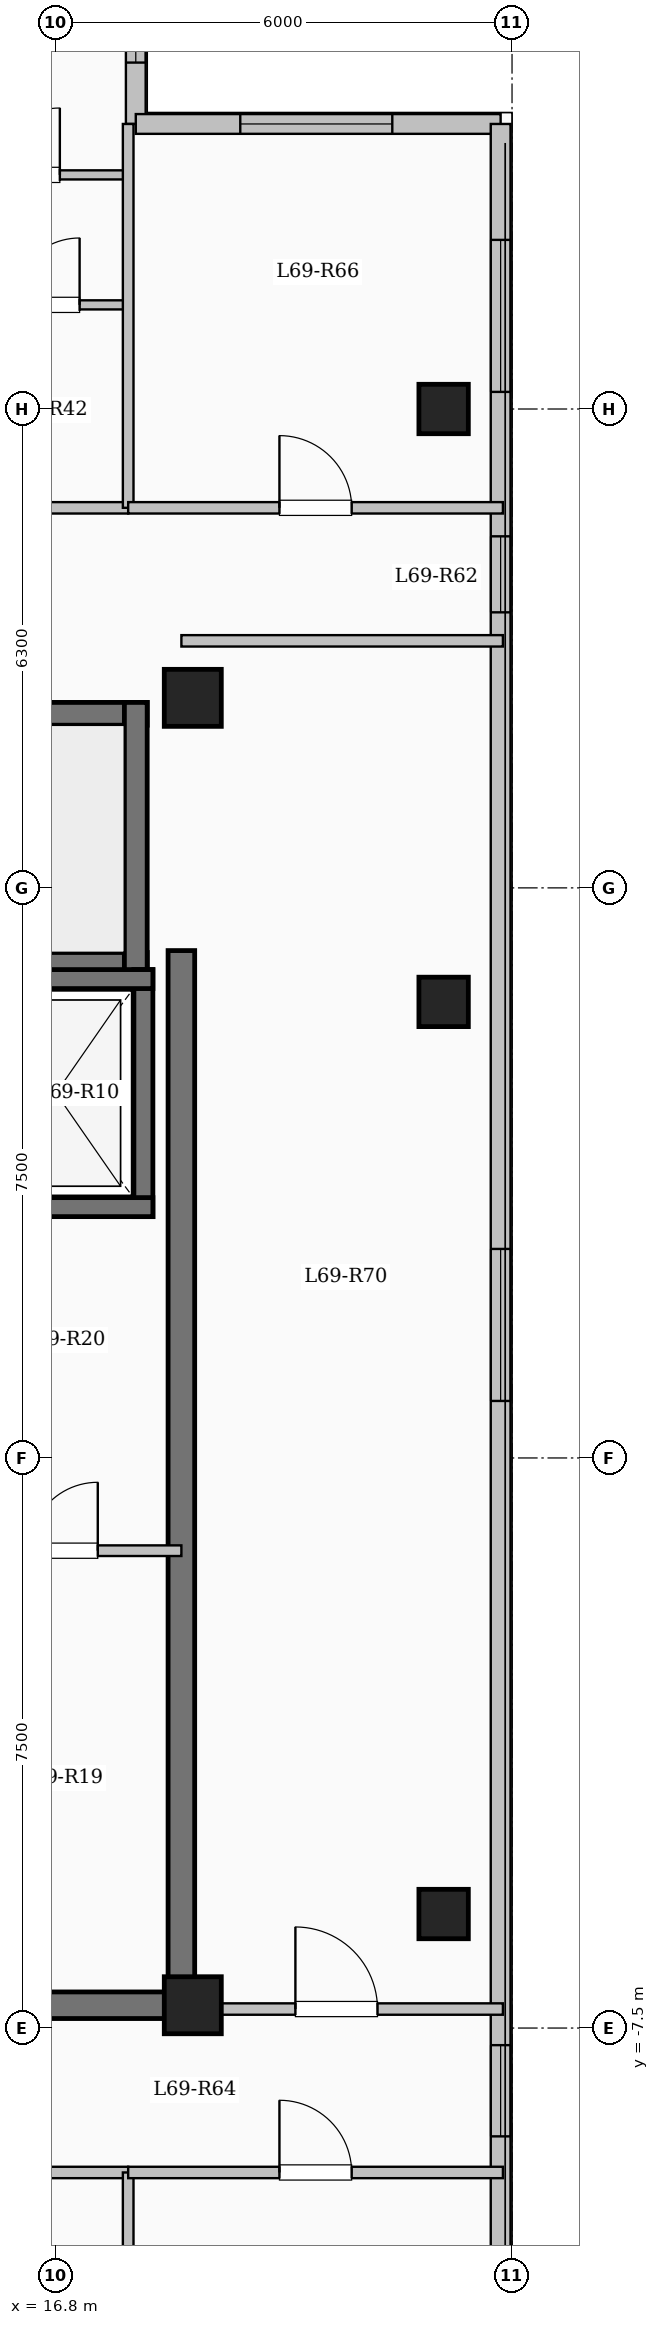
"""IFC4 building model, lengths in metres.
Left out: names, types, materials, properties, quantities, classifications, styles, units other than length and angle.
Written with IfcOpenShell. Run it as: python <this file> out.ifc"""

import sys

from ifc_helpers import new_model, si_unit, direction, frame, frame_2d, origin, origin_2d, place, context, subcontext, project, spatial, rectangle, extrude, element, fill, save


model = new_model("IFC4")
c1 = context("Model", 3, precision=1e-05, world=origin(), true_north=direction((0.0, 1.0)))
c2 = subcontext(c1, "Body", "Model", "MODEL_VIEW")
j1 = project(units=[si_unit("LENGTHUNIT", "METRE"), si_unit("PLANEANGLEUNIT", "RADIAN")], contexts=[c1])
p1 = place(None, origin())
s1 = spatial("IfcSite", under=j1, at=p1, CompositionType="ELEMENT")
p2 = place(p1, origin())
s2 = spatial("IfcBuilding", under=s1, at=p2, CompositionType="ELEMENT")
p3 = place(p2, frame((0.0, 0.0, 254.9)))
s3 = spatial("IfcBuildingStorey", under=s2, at=p3, CompositionType="ELEMENT", Elevation=254.9)
for number, where, z_axis, x_axis in (
    (1, (18.6, -7.2, 0.0), (0.0, 0.0, 1.0), (1.0, 0.0, 0.0)),
    (2, (18.6, 10.0, 0.0), (0.0, 0.0, 1.0), (1.0, 0.0, 0.0)),
):
    element("IfcColumn", number, at=place(p3, frame(where, z_axis=z_axis, x_axis=x_axis)), inside=s3, PredefinedType="COLUMN", context=c2, shape_type="SweptSolid", body=[
        extrude(rectangle(XDim=0.75, YDim=0.75, at=origin_2d()), origin(), (0.0, 0.0, 1.0), 3.35),
    ])
for number, where, z_axis, x_axis in (
    (3, (21.9, -6.0, 0.0), (0.0, 0.0, 1.0), (1.0, 0.0, 0.0)),
    (4, (21.9, 6.0, 0.0), (0.0, 0.0, 1.0), (1.0, 0.0, 0.0)),
    (5, (21.9, 13.8, 0.0), (0.0, 0.0, 1.0), (1.0, 0.0, 0.0)),
):
    element("IfcColumn", number, at=place(p3, frame(where, z_axis=z_axis, x_axis=x_axis)), inside=s3, PredefinedType="COLUMN", context=c2, shape_type="SweptSolid", body=[
        extrude(rectangle(XDim=0.65, YDim=0.65, at=origin_2d()), origin(), (0.0, 0.0, 1.0), 3.35),
    ])
p4 = place(p3, frame((17.85, 20.85, 0.0), z_axis=(0.0, 0.0, 1.0), x_axis=(0.0, -1.0, 0.0)))
e6 = element("IfcWall", 6, at=p4, inside=s3, PredefinedType="SOLIDWALL", context=c2, shape_type="SweptSolid", body=[
    extrude(rectangle(XDim=3.3, YDim=0.26, at=frame_2d((1.65, 0.0))), origin(), (0.0, 0.0, 1.0), 3.1),
])
p5 = place(p4, frame((0.843, 0.0, 0.9)))
e7 = element("IfcOpeningElement", 7, at=p5, cuts=e6, PredefinedType="OPENING", context=c2, shape_type="SweptSolid", body=[
    extrude(rectangle(XDim=1.65, YDim=1.6, at=frame_2d((0.825, 0.8))), frame((0.0, 0.14, 0.0), z_axis=(0.0, -1.0, 0.0), x_axis=(1.0, 0.0, 0.0)), (0.0, 0.0, 1.0), 0.28),
])
p6 = place(p3, frame((17.85, 17.55, 0.0), z_axis=(0.0, 0.0, 1.0), x_axis=(1.0, 0.0, 0.0)))
e8 = element("IfcWall", 8, at=p6, inside=s3, PredefinedType="SOLIDWALL", context=c2, shape_type="SweptSolid", body=[
    extrude(rectangle(XDim=4.8, YDim=0.26, at=frame_2d((2.4, 0.0))), origin(), (0.0, 0.0, 1.0), 3.1),
])
p7 = place(p6, frame((1.375, 0.0, 0.9)))
e9 = element("IfcOpeningElement", 9, at=p7, cuts=e8, PredefinedType="OPENING", context=c2, shape_type="SweptSolid", body=[
    extrude(rectangle(XDim=2.0, YDim=1.7, at=frame_2d((1.0, 0.85))), frame((0.0, 0.14, 0.0), z_axis=(0.0, -1.0, 0.0), x_axis=(1.0, 0.0, 0.0)), (0.0, 0.0, 1.0), 0.28),
])
p8 = place(p3, frame((22.65, 17.55, 0.0), z_axis=(0.0, 0.0, 1.0), x_axis=(0.0, -1.0, 0.0)))
e10 = element("IfcWall", 10, at=p8, inside=s3, PredefinedType="SOLIDWALL", context=c2, shape_type="SweptSolid", body=[
    extrude(rectangle(XDim=35.1, YDim=0.26, at=frame_2d((17.55, 0.0))), origin(), (0.0, 0.0, 1.0), 3.1),
])
p9 = place(p8, frame((1.525, 0.0, 0.9)))
e11 = element("IfcOpeningElement", 11, at=p9, cuts=e10, PredefinedType="OPENING", context=c2, shape_type="SweptSolid", body=[
    extrude(rectangle(XDim=2.0, YDim=1.7, at=frame_2d((1.0, 0.85))), frame((0.0, 0.14, 0.0), z_axis=(0.0, -1.0, 0.0), x_axis=(1.0, 0.0, 0.0)), (0.0, 0.0, 1.0), 0.28),
])
p10 = place(p8, frame((5.425, 0.0, 0.95)))
e12 = element("IfcOpeningElement", 12, at=p10, cuts=e10, PredefinedType="OPENING", context=c2, shape_type="SweptSolid", body=[
    extrude(rectangle(XDim=1.0, YDim=1.5, at=frame_2d((0.5, 0.75))), frame((0.0, 0.14, 0.0), z_axis=(0.0, -1.0, 0.0), x_axis=(1.0, 0.0, 0.0)), (0.0, 0.0, 1.0), 0.28),
])
p11 = place(p8, frame((14.8, 0.0, 0.9)))
e13 = element("IfcOpeningElement", 13, at=p11, cuts=e10, PredefinedType="OPENING", context=c2, shape_type="SweptSolid", body=[
    extrude(rectangle(XDim=2.0, YDim=1.7, at=frame_2d((1.0, 0.85))), frame((0.0, 0.14, 0.0), z_axis=(0.0, -1.0, 0.0), x_axis=(1.0, 0.0, 0.0)), (0.0, 0.0, 1.0), 0.28),
])
p12 = place(p8, frame((25.275, 0.0, 0.95)))
e14 = element("IfcOpeningElement", 14, at=p12, cuts=e10, PredefinedType="OPENING", context=c2, shape_type="SweptSolid", body=[
    extrude(rectangle(XDim=1.2, YDim=1.5, at=frame_2d((0.6, 0.75))), frame((0.0, 0.14, 0.0), z_axis=(0.0, -1.0, 0.0), x_axis=(1.0, 0.0, 0.0)), (0.0, 0.0, 1.0), 0.28),
])
p13 = place(p8, frame((29.925, 0.0, 0.9)))
e15 = element("IfcOpeningElement", 15, at=p13, cuts=e10, PredefinedType="OPENING", context=c2, shape_type="SweptSolid", body=[
    extrude(rectangle(XDim=2.2, YDim=1.75, at=frame_2d((1.1, 0.875))), frame((0.0, 0.14, 0.0), z_axis=(0.0, -1.0, 0.0), x_axis=(1.0, 0.0, 0.0)), (0.0, 0.0, 1.0), 0.28),
])
p14 = place(p3, frame((10.0, 9.79, 0.0), z_axis=(0.0, 0.0, 1.0), x_axis=(1.0, 0.0, 0.0)))
e16 = element("IfcWall", 16, at=p14, inside=s3, PredefinedType="SHEAR", context=c2, shape_type="SweptSolid", body=[
    extrude(rectangle(XDim=8.0, YDim=0.3, at=frame_2d((4.0, 0.0))), origin(), (0.0, 0.0, 1.0), 3.35),
])
p15 = place(p3, frame((10.0, 6.5, 0.0), z_axis=(0.0, 0.0, 1.0), x_axis=(1.0, 0.0, 0.0)))
e17 = element("IfcWall", 17, at=p15, inside=s3, PredefinedType="SHEAR", context=c2, shape_type="SweptSolid", body=[
    extrude(rectangle(XDim=8.0, YDim=0.3, at=frame_2d((4.0, 0.0))), origin(), (0.0, 0.0, 1.0), 3.35),
])
p16 = place(p15, frame((0.55, 0.0, 0.0)))
e18 = element("IfcOpeningElement", 18, at=p16, cuts=e17, PredefinedType="OPENING", context=c2, shape_type="SweptSolid", body=[
    extrude(rectangle(XDim=1.0, YDim=2.15, at=frame_2d((0.5, 1.075))), frame((0.0, 0.16, 0.0), z_axis=(0.0, -1.0, 0.0), x_axis=(1.0, 0.0, 0.0)), (0.0, 0.0, 1.0), 0.32),
])
p17 = place(p3, frame((17.85, 6.35, 0.0), z_axis=(0.0, 0.0, 1.0), x_axis=(0.0, 1.0, 0.0)))
e19 = element("IfcWall", 19, at=p17, inside=s3, PredefinedType="SHEAR", context=c2, shape_type="SweptSolid", body=[
    extrude(rectangle(XDim=3.59, YDim=0.3, at=frame_2d((1.795, 0.0))), origin(), (0.0, 0.0, 1.0), 3.35),
])
p18 = place(p3, frame((17.95, 3.175, 0.0), z_axis=(0.0, 0.0, 1.0), x_axis=(0.0, 1.0, 0.0)))
e20 = element("IfcWall", 20, at=p18, inside=s3, PredefinedType="SHEAR", context=c2, shape_type="SweptSolid", body=[
    extrude(rectangle(XDim=3.25, YDim=0.25, at=frame_2d((1.625, 0.0))), origin(), (0.0, 0.0, 1.0), 3.35),
])
for number, where, z_axis, x_axis in (
    (21, (15.525, 3.3, 0.0), (0.0, 0.0, 1.0), (1.0, 0.0, 0.0)),
    (22, (15.525, 6.3, 0.0), (0.0, 0.0, 1.0), (1.0, 0.0, 0.0)),
):
    element("IfcWall", number, at=place(p3, frame(where, z_axis=z_axis, x_axis=x_axis)), inside=s3, PredefinedType="SHEAR", context=c2, shape_type="SweptSolid", body=[
        extrude(rectangle(XDim=2.55, YDim=0.25, at=frame_2d((1.275, 0.0))), origin(), (0.0, 0.0, 1.0), 3.35),
    ])
p19 = place(p3, frame((18.45, -7.375, 0.0), z_axis=(0.0, 0.0, 1.0), x_axis=(0.0, 1.0, 0.0)))
e23 = element("IfcWall", 23, at=p19, inside=s3, PredefinedType="SHEAR", context=c2, shape_type="SweptSolid", body=[
    extrude(rectangle(XDim=14.05, YDim=0.35, at=frame_2d((7.025, 0.0))), origin(), (0.0, 0.0, 1.0), 3.35),
])
p20 = place(p3, frame((12.625, -7.2, 0.0), z_axis=(0.0, 0.0, 1.0), x_axis=(1.0, 0.0, 0.0)))
e24 = element("IfcWall", 24, at=p20, inside=s3, PredefinedType="SHEAR", context=c2, shape_type="SweptSolid", body=[
    extrude(rectangle(XDim=6.0, YDim=0.35, at=frame_2d((3.0, 0.0))), origin(), (0.0, 0.0, 1.0), 3.35),
])
p21 = place(p3, frame((15.4, -1.22, 0.0), z_axis=(0.0, 0.0, 1.0), x_axis=(1.0, 0.0, 0.0)))
e25 = element("IfcWall", 25, at=p21, inside=s3, PredefinedType="PARTITIONING", context=c2, shape_type="SweptSolid", body=[
    extrude(rectangle(XDim=3.05, YDim=0.14, at=frame_2d((1.525, 0.0))), origin(), (0.0, 0.0, 1.0), 3.1),
])
p22 = place(p21, frame((1.05, 0.0, 0.0)))
e26 = element("IfcOpeningElement", 26, at=p22, cuts=e25, PredefinedType="OPENING", context=c2, shape_type="SweptSolid", body=[
    extrude(rectangle(XDim=0.9, YDim=2.08, at=frame_2d((0.45, 1.04))), frame((0.0, 0.08, 0.0), z_axis=(0.0, -1.0, 0.0), x_axis=(1.0, 0.0, 0.0)), (0.0, 0.0, 1.0), 0.16),
])
p23 = place(p3, frame((3.85, 12.5, 0.0), z_axis=(0.0, 0.0, 1.0), x_axis=(1.0, 0.0, 0.0)))
e27 = element("IfcWall", 27, at=p23, inside=s3, PredefinedType="PARTITIONING", context=c2, shape_type="SweptSolid", body=[
    extrude(rectangle(XDim=13.9, YDim=0.15, at=frame_2d((6.95, 0.0))), origin(), (0.0, 0.0, 1.0), 3.1),
])
p24 = place(p23, frame((1.45, 0.0, 0.0)))
e28 = element("IfcOpeningElement", 28, at=p24, cuts=e27, PredefinedType="OPENING", context=c2, shape_type="SweptSolid", body=[
    extrude(rectangle(XDim=0.96, YDim=2.15, at=frame_2d((0.48, 1.075))), frame((0.0, 0.085, 0.0), z_axis=(0.0, -1.0, 0.0), x_axis=(1.0, 0.0, 0.0)), (0.0, 0.0, 1.0), 0.17),
])
p25 = place(p23, frame((6.35, 0.0, 0.0)))
e29 = element("IfcOpeningElement", 29, at=p25, cuts=e27, PredefinedType="OPENING", context=c2, shape_type="SweptSolid", body=[
    extrude(rectangle(XDim=0.96, YDim=2.15, at=frame_2d((0.48, 1.075))), frame((0.0, 0.085, 0.0), z_axis=(0.0, -1.0, 0.0), x_axis=(1.0, 0.0, 0.0)), (0.0, 0.0, 1.0), 0.17),
])
p26 = place(p3, frame((8.55, -9.4, 0.0), z_axis=(0.0, 0.0, 1.0), x_axis=(1.0, 0.0, 0.0)))
e30 = element("IfcWall", 30, at=p26, inside=s3, PredefinedType="PARTITIONING", context=c2, shape_type="SweptSolid", body=[
    extrude(rectangle(XDim=9.2, YDim=0.15, at=frame_2d((4.6, 0.0))), origin(), (0.0, 0.0, 1.0), 3.1),
])
p27 = place(p26, frame((0.75, 0.0, 0.0)))
e31 = element("IfcOpeningElement", 31, at=p27, cuts=e30, PredefinedType="OPENING", context=c2, shape_type="SweptSolid", body=[
    extrude(rectangle(XDim=0.96, YDim=2.15, at=frame_2d((0.48, 1.075))), frame((0.0, 0.085, 0.0), z_axis=(0.0, -1.0, 0.0), x_axis=(1.0, 0.0, 0.0)), (0.0, 0.0, 1.0), 0.17),
])
p28 = place(p3, frame((15.592, 15.17, 0.0), z_axis=(0.0, 0.0, 1.0), x_axis=(1.0, 0.0, 0.0)))
e32 = element("IfcWall", 32, at=p28, inside=s3, PredefinedType="PARTITIONING", context=c2, shape_type="SweptSolid", body=[
    extrude(rectangle(XDim=2.158, YDim=0.12, at=frame_2d((1.079, 0.0))), origin(), (0.0, 0.0, 1.0), 3.1),
])
p29 = place(p28, frame((0.639, 0.0, 0.0)))
e33 = element("IfcOpeningElement", 33, at=p29, cuts=e32, PredefinedType="OPENING", context=c2, shape_type="SweptSolid", body=[
    extrude(rectangle(XDim=0.88, YDim=2.1, at=frame_2d((0.44, 1.05))), frame((0.0, 0.07, 0.0), z_axis=(0.0, -1.0, 0.0), x_axis=(1.0, 0.0, 0.0)), (0.0, 0.0, 1.0), 0.14),
])
p30 = place(p3, frame((12.752, 16.88, 0.0), z_axis=(0.0, 0.0, 1.0), x_axis=(1.0, 0.0, 0.0)))
e34 = element("IfcWall", 34, at=p30, inside=s3, PredefinedType="PARTITIONING", context=c2, shape_type="SweptSolid", body=[
    extrude(rectangle(XDim=5.058, YDim=0.12, at=frame_2d((2.529, 0.0))), origin(), (0.0, 0.0, 1.0), 2.785),
])
p31 = place(p30, frame((0.78, 0.0, 0.0)))
e35 = element("IfcOpeningElement", 35, at=p31, cuts=e34, PredefinedType="OPENING", context=c2, shape_type="SweptSolid", body=[
    extrude(rectangle(XDim=0.88, YDim=2.1, at=frame_2d((0.44, 1.05))), frame((0.0, 0.07, 0.0), z_axis=(0.0, -1.0, 0.0), x_axis=(1.0, 0.0, 0.0)), (0.0, 0.0, 1.0), 0.14),
])
p32 = place(p30, frame((3.219, 0.0, 0.0)))
e36 = element("IfcOpeningElement", 36, at=p32, cuts=e34, PredefinedType="OPENING", context=c2, shape_type="SweptSolid", body=[
    extrude(rectangle(XDim=0.88, YDim=2.1, at=frame_2d((0.44, 1.05))), frame((0.0, 0.07, 0.0), z_axis=(0.0, -1.0, 0.0), x_axis=(1.0, 0.0, 0.0)), (0.0, 0.0, 1.0), 0.14),
])
p33 = place(p3, frame((18.45, -7.25, 0.0), z_axis=(0.0, 0.0, 1.0), x_axis=(1.0, 0.0, 0.0)))
e37 = element("IfcWall", 37, at=p33, inside=s3, PredefinedType="PARTITIONING", context=c2, shape_type="SweptSolid", body=[
    extrude(rectangle(XDim=4.23, YDim=0.15, at=frame_2d((2.115, 0.0))), origin(), (0.0, 0.0, 1.0), 3.1),
])
p34 = place(p33, frame((1.5, 0.0, 0.0)))
e38 = element("IfcOpeningElement", 38, at=p34, cuts=e37, PredefinedType="OPENING", context=c2, shape_type="SweptSolid", body=[
    extrude(rectangle(XDim=1.08, YDim=2.15, at=frame_2d((0.54, 1.075))), frame((0.0, 0.085, 0.0), z_axis=(0.0, -1.0, 0.0), x_axis=(1.0, 0.0, 0.0)), (0.0, 0.0, 1.0), 0.17),
])
p35 = place(p3, frame((18.45, 10.75, 0.0), z_axis=(0.0, 0.0, 1.0), x_axis=(1.0, 0.0, 0.0)))
e39 = element("IfcWall", 39, at=p35, inside=s3, PredefinedType="PARTITIONING", context=c2, shape_type="SweptSolid", body=[
    extrude(rectangle(XDim=4.23, YDim=0.15, at=frame_2d((2.115, 0.0))), origin(), (0.0, 0.0, 1.0), 3.1),
])
p36 = place(p3, frame((17.75, -17.55, 0.0), z_axis=(0.0, 0.0, 1.0), x_axis=(0.0, 1.0, 0.0)))
e40 = element("IfcWall", 40, at=p36, inside=s3, PredefinedType="PARTITIONING", context=c2, shape_type="SweptSolid", body=[
    extrude(rectangle(XDim=8.15, YDim=0.14, at=frame_2d((4.075, 0.0))), origin(), (0.0, 0.0, 1.0), 3.1),
])
p37 = place(p3, frame((17.75, 12.5, 0.0), z_axis=(0.0, 0.0, 1.0), x_axis=(0.0, 1.0, 0.0)))
e41 = element("IfcWall", 41, at=p37, inside=s3, PredefinedType="PARTITIONING", context=c2, shape_type="SweptSolid", body=[
    extrude(rectangle(XDim=5.05, YDim=0.14, at=frame_2d((2.525, 0.0))), origin(), (0.0, 0.0, 1.0), 3.1),
])
p38 = place(p3, frame((17.75, 12.5, 0.0), z_axis=(0.0, 0.0, 1.0), x_axis=(1.0, 0.0, 0.0)))
e42 = element("IfcWall", 42, at=p38, inside=s3, PredefinedType="PARTITIONING", context=c2, shape_type="SweptSolid", body=[
    extrude(rectangle(XDim=4.93, YDim=0.15, at=frame_2d((2.465, 0.0))), origin(), (0.0, 0.0, 1.0), 3.1),
])
p39 = place(p38, frame((1.99, 0.0, 0.0)))
e43 = element("IfcOpeningElement", 43, at=p39, cuts=e42, PredefinedType="OPENING", context=c2, shape_type="SweptSolid", body=[
    extrude(rectangle(XDim=0.95, YDim=2.15, at=frame_2d((0.475, 1.075))), frame((0.0, 0.085, 0.0), z_axis=(0.0, -1.0, 0.0), x_axis=(1.0, 0.0, 0.0)), (0.0, 0.0, 1.0), 0.17),
])
p40 = place(p3, frame((17.75, -9.4, 0.0), z_axis=(0.0, 0.0, 1.0), x_axis=(1.0, 0.0, 0.0)))
e44 = element("IfcWall", 44, at=p40, inside=s3, PredefinedType="PARTITIONING", context=c2, shape_type="SweptSolid", body=[
    extrude(rectangle(XDim=4.93, YDim=0.15, at=frame_2d((2.465, 0.0))), origin(), (0.0, 0.0, 1.0), 3.1),
])
p41 = place(p40, frame((1.99, 0.0, 0.0)))
e45 = element("IfcOpeningElement", 45, at=p41, cuts=e44, PredefinedType="OPENING", context=c2, shape_type="SweptSolid", body=[
    extrude(rectangle(XDim=0.95, YDim=2.15, at=frame_2d((0.475, 1.075))), frame((0.0, 0.085, 0.0), z_axis=(0.0, -1.0, 0.0), x_axis=(1.0, 0.0, 0.0)), (0.0, 0.0, 1.0), 0.17),
])
p42 = place(p5, origin())
e46 = element("IfcWindow", 46, at=p42, inside=s3, PartitioningType="SINGLE_PANEL", PredefinedType="WINDOW", context=c2, shape_type="SweptSolid", body=[
    extrude(rectangle(XDim=1.65, YDim=1.6, at=frame_2d((0.825, 0.8))), frame((0.0, 0.03, 0.0), z_axis=(0.0, -1.0, 0.0), x_axis=(1.0, 0.0, 0.0)), (0.0, 0.0, 1.0), 0.06),
])
fill(e7, e46)
p43 = place(p7, origin())
e47 = element("IfcWindow", 47, at=p43, inside=s3, PartitioningType="SINGLE_PANEL", PredefinedType="WINDOW", context=c2, shape_type="SweptSolid", body=[
    extrude(rectangle(XDim=2.0, YDim=1.7, at=frame_2d((1.0, 0.85))), frame((0.0, 0.03, 0.0), z_axis=(0.0, -1.0, 0.0), x_axis=(1.0, 0.0, 0.0)), (0.0, 0.0, 1.0), 0.06),
])
fill(e9, e47)
p44 = place(p9, origin())
e48 = element("IfcWindow", 48, at=p44, inside=s3, PartitioningType="SINGLE_PANEL", PredefinedType="WINDOW", context=c2, shape_type="SweptSolid", body=[
    extrude(rectangle(XDim=2.0, YDim=1.7, at=frame_2d((1.0, 0.85))), frame((0.0, 0.03, 0.0), z_axis=(0.0, -1.0, 0.0), x_axis=(1.0, 0.0, 0.0)), (0.0, 0.0, 1.0), 0.06),
])
fill(e11, e48)
p45 = place(p10, origin())
e49 = element("IfcWindow", 49, at=p45, inside=s3, PartitioningType="SINGLE_PANEL", PredefinedType="WINDOW", context=c2, shape_type="SweptSolid", body=[
    extrude(rectangle(XDim=1.0, YDim=1.5, at=frame_2d((0.5, 0.75))), frame((0.0, 0.03, 0.0), z_axis=(0.0, -1.0, 0.0), x_axis=(1.0, 0.0, 0.0)), (0.0, 0.0, 1.0), 0.06),
])
fill(e12, e49)
p46 = place(p11, origin())
e50 = element("IfcWindow", 50, at=p46, inside=s3, PartitioningType="SINGLE_PANEL", PredefinedType="WINDOW", context=c2, shape_type="SweptSolid", body=[
    extrude(rectangle(XDim=2.0, YDim=1.7, at=frame_2d((1.0, 0.85))), frame((0.0, 0.03, 0.0), z_axis=(0.0, -1.0, 0.0), x_axis=(1.0, 0.0, 0.0)), (0.0, 0.0, 1.0), 0.06),
])
fill(e13, e50)
p47 = place(p12, origin())
e51 = element("IfcWindow", 51, at=p47, inside=s3, PartitioningType="SINGLE_PANEL", PredefinedType="WINDOW", context=c2, shape_type="SweptSolid", body=[
    extrude(rectangle(XDim=1.2, YDim=1.5, at=frame_2d((0.6, 0.75))), frame((0.0, 0.03, 0.0), z_axis=(0.0, -1.0, 0.0), x_axis=(1.0, 0.0, 0.0)), (0.0, 0.0, 1.0), 0.06),
])
fill(e14, e51)
p48 = place(p22, origin())
e52 = element("IfcDoor", 52, at=p48, inside=s3, OperationType="SINGLE_SWING_RIGHT", PredefinedType="DOOR", context=c2, shape_type="SweptSolid", body=[
    extrude(rectangle(XDim=0.9, YDim=2.08, at=frame_2d((0.45, 1.04))), frame((0.0, 0.025, 0.0), z_axis=(0.0, -1.0, 0.0), x_axis=(1.0, 0.0, 0.0)), (0.0, 0.0, 1.0), 0.05),
])
fill(e26, e52)
p49 = place(p29, origin())
e53 = element("IfcDoor", 53, at=p49, inside=s3, OperationType="SINGLE_SWING_RIGHT", PredefinedType="DOOR", context=c2, shape_type="SweptSolid", body=[
    extrude(rectangle(XDim=0.88, YDim=2.1, at=frame_2d((0.44, 1.05))), frame((0.0, 0.025, 0.0), z_axis=(0.0, -1.0, 0.0), x_axis=(1.0, 0.0, 0.0)), (0.0, 0.0, 1.0), 0.05),
])
fill(e33, e53)
p50 = place(p32, origin())
e54 = element("IfcDoor", 54, at=p50, inside=s3, OperationType="SINGLE_SWING_RIGHT", PredefinedType="DOOR", context=c2, shape_type="SweptSolid", body=[
    extrude(rectangle(XDim=0.88, YDim=2.1, at=frame_2d((0.44, 1.05))), frame((0.0, 0.025, 0.0), z_axis=(0.0, -1.0, 0.0), x_axis=(1.0, 0.0, 0.0)), (0.0, 0.0, 1.0), 0.05),
])
fill(e36, e54)
p51 = place(p39, origin())
e55 = element("IfcDoor", 55, at=p51, inside=s3, OperationType="SINGLE_SWING_LEFT", PredefinedType="DOOR", context=c2, shape_type="SweptSolid", body=[
    extrude(rectangle(XDim=0.95, YDim=2.15, at=frame_2d((0.475, 1.075))), frame((0.0, 0.025, 0.0), z_axis=(0.0, -1.0, 0.0), x_axis=(1.0, 0.0, 0.0)), (0.0, 0.0, 1.0), 0.05),
])
fill(e43, e55)
p52 = place(p41, origin())
e56 = element("IfcDoor", 56, at=p52, inside=s3, OperationType="SINGLE_SWING_LEFT", PredefinedType="DOOR", context=c2, shape_type="SweptSolid", body=[
    extrude(rectangle(XDim=0.95, YDim=2.15, at=frame_2d((0.475, 1.075))), frame((0.0, 0.025, 0.0), z_axis=(0.0, -1.0, 0.0), x_axis=(1.0, 0.0, 0.0)), (0.0, 0.0, 1.0), 0.05),
])
fill(e45, e56)
p53 = place(p34, origin())
e57 = element("IfcDoor", 57, at=p53, inside=s3, OperationType="SINGLE_SWING_LEFT", PredefinedType="DOOR", context=c2, shape_type="SweptSolid", body=[
    extrude(rectangle(XDim=1.08, YDim=2.15, at=frame_2d((0.54, 1.075))), frame((0.0, 0.025, 0.0), z_axis=(0.0, -1.0, 0.0), x_axis=(1.0, 0.0, 0.0)), (0.0, 0.0, 1.0), 0.05),
])
fill(e38, e57)
save(model, sys.argv[1])
